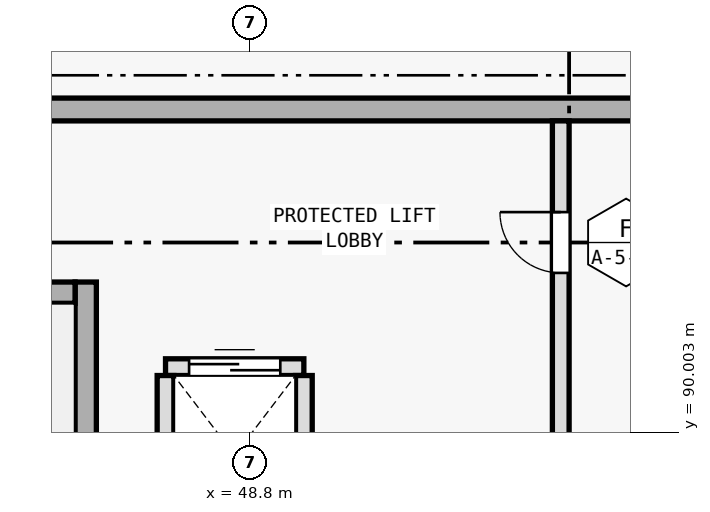
"""IFC4 building model, lengths in metres.
Left out: names, types, materials, properties, quantities, classifications, styles, units other than length and angle.
Written with IfcOpenShell. Run it as: python <this file> out.ifc"""

import sys

from ifc_helpers import new_model, si_unit, direction, frame, frame_2d, origin, place, context, subcontext, project, spatial, rectangle, extrude, element, fill, save


model = new_model("IFC4")
c1 = context("Model", 3, precision=1e-05, world=origin(), true_north=direction((0.0, 1.0)))
c2 = subcontext(c1, "Body", "Model", "MODEL_VIEW")
j1 = project(units=[si_unit("LENGTHUNIT", "METRE"), si_unit("PLANEANGLEUNIT", "RADIAN")], contexts=[c1])
p1 = place(None, origin())
s1 = spatial("IfcSite", under=j1, at=p1, CompositionType="ELEMENT")
p2 = place(p1, origin())
s2 = spatial("IfcBuilding", under=s1, at=p2, CompositionType="ELEMENT")
p3 = place(p2, frame((0.0, 0.0, -4.8)))
s3 = spatial("IfcBuildingStorey", under=s2, at=p3, CompositionType="ELEMENT", Elevation=-4.8)
p4 = place(p3, frame((38.4, 94.25, 0.0), z_axis=(0.0, 0.0, 1.0), x_axis=(1.0, 0.0, 0.0)))
e1 = element("IfcWall", 1, at=p4, inside=s3, PredefinedType="SHEAR", context=c2, shape_type="SweptSolid", body=[
    extrude(rectangle(XDim=16.0, YDim=0.3, at=frame_2d((8.0, 0.0))), origin(), (0.0, 0.0, 1.0), 4.795),
])
p5 = place(p3, frame((46.64, 88.3, 0.0), z_axis=(0.0, 0.0, 1.0), x_axis=(0.0, 1.0, 0.0)))
e2 = element("IfcWall", 2, at=p5, inside=s3, PredefinedType="SHEAR", context=c2, shape_type="SweptSolid", body=[
    extrude(rectangle(XDim=3.68, YDim=0.28, at=frame_2d((1.84, 0.0))), origin(), (0.0, 0.0, 1.0), 4.795),
])
p6 = place(p3, frame((38.7, 91.84, 0.0), z_axis=(0.0, 0.0, 1.0), x_axis=(1.0, 0.0, 0.0)))
e3 = element("IfcWall", 3, at=p6, inside=s3, PredefinedType="SHEAR", context=c2, shape_type="SweptSolid", body=[
    extrude(rectangle(XDim=7.8, YDim=0.28, at=frame_2d((3.9, 0.0))), origin(), (0.0, 0.0, 1.0), 4.795),
])
p7 = place(p6, frame((0.2, 0.0, 0.0)))
e4 = element("IfcOpeningElement", 4, at=p7, cuts=e3, PredefinedType="OPENING", context=c2, shape_type="SweptSolid", body=[
    extrude(rectangle(XDim=1.3, YDim=2.2, at=frame_2d((0.65, 1.1))), frame((0.0, 0.15, 0.0), z_axis=(0.0, -1.0, 0.0), x_axis=(1.0, 0.0, 0.0)), (0.0, 0.0, 1.0), 0.3),
])
p8 = place(p3, frame((47.69, 90.86, 0.0), z_axis=(0.0, 0.0, 1.0), x_axis=(1.0, 0.0, 0.0)))
e5 = element("IfcWall", 5, at=p8, inside=s3, PredefinedType="PLUMBINGWALL", context=c2, shape_type="SweptSolid", body=[
    extrude(rectangle(XDim=1.82, YDim=0.22, at=frame_2d((0.91, 0.0))), origin(), (0.0, 0.0, 1.0), 4.38),
])
p9 = place(p8, frame((0.31, 0.0, 0.0)))
e6 = element("IfcOpeningElement", 6, at=p9, cuts=e5, PredefinedType="OPENING", context=c2, shape_type="SweptSolid", body=[
    extrude(rectangle(XDim=1.2, YDim=2.25, at=frame_2d((0.6, 1.125))), frame((0.0, 0.12, 0.0), z_axis=(0.0, -1.0, 0.0), x_axis=(1.0, 0.0, 0.0)), (0.0, 0.0, 1.0), 0.24),
])
for number, where, z_axis, x_axis in (
    (7, (47.69, 88.65, 0.0), (0.0, 0.0, 1.0), (0.0, 1.0, 0.0)),
    (8, (49.51, 88.65, 0.0), (0.0, 0.0, 1.0), (0.0, 1.0, 0.0)),
):
    element("IfcWall", number, at=place(p3, frame(where, z_axis=z_axis, x_axis=x_axis)), inside=s3, PredefinedType="PLUMBINGWALL", context=c2, shape_type="SweptSolid", body=[
        extrude(rectangle(XDim=2.1, YDim=0.22, at=frame_2d((1.05, 0.0))), origin(), (0.0, 0.0, 1.0), 4.38),
    ])
p10 = place(p3, frame((52.89, 88.3, 0.0), z_axis=(0.0, 0.0, 1.0), x_axis=(0.0, 1.0, 0.0)))
e9 = element("IfcWall", 9, at=p10, inside=s3, PredefinedType="PLUMBINGWALL", context=c2, shape_type="SweptSolid", body=[
    extrude(rectangle(XDim=5.8, YDim=0.22, at=frame_2d((2.9, 0.0))), origin(), (0.0, 0.0, 1.0), 4.38),
])
p11 = place(p10, frame((3.8, 0.0, 0.0)))
e10 = element("IfcOpeningElement", 10, at=p11, cuts=e9, PredefinedType="OPENING", context=c2, shape_type="SweptSolid", body=[
    extrude(rectangle(XDim=0.8, YDim=2.1, at=frame_2d((0.4, 1.05))), frame((0.0, 0.12, 0.0), z_axis=(0.0, -1.0, 0.0), x_axis=(1.0, 0.0, 0.0)), (0.0, 0.0, 1.0), 0.24),
])
p12 = place(p9, origin())
e11 = element("IfcDoor", 11, at=p12, inside=s3, OperationType="DOUBLE_DOOR_SLIDING", PredefinedType="DOOR", context=c2, shape_type="SweptSolid", body=[
    extrude(rectangle(XDim=1.2, YDim=2.25, at=frame_2d((0.6, 1.125))), frame((0.0, 0.025, 0.0), z_axis=(0.0, -1.0, 0.0), x_axis=(1.0, 0.0, 0.0)), (0.0, 0.0, 1.0), 0.05),
])
fill(e6, e11)
p13 = place(p11, origin())
e12 = element("IfcDoor", 12, at=p13, inside=s3, OperationType="SINGLE_SWING_RIGHT", PredefinedType="DOOR", context=c2, shape_type="SweptSolid", body=[
    extrude(rectangle(XDim=0.8, YDim=2.1, at=frame_2d((0.4, 1.05))), frame((0.0, 0.025, 0.0), z_axis=(0.0, -1.0, 0.0), x_axis=(1.0, 0.0, 0.0)), (0.0, 0.0, 1.0), 0.05),
])
fill(e10, e12)
save(model, sys.argv[1])
